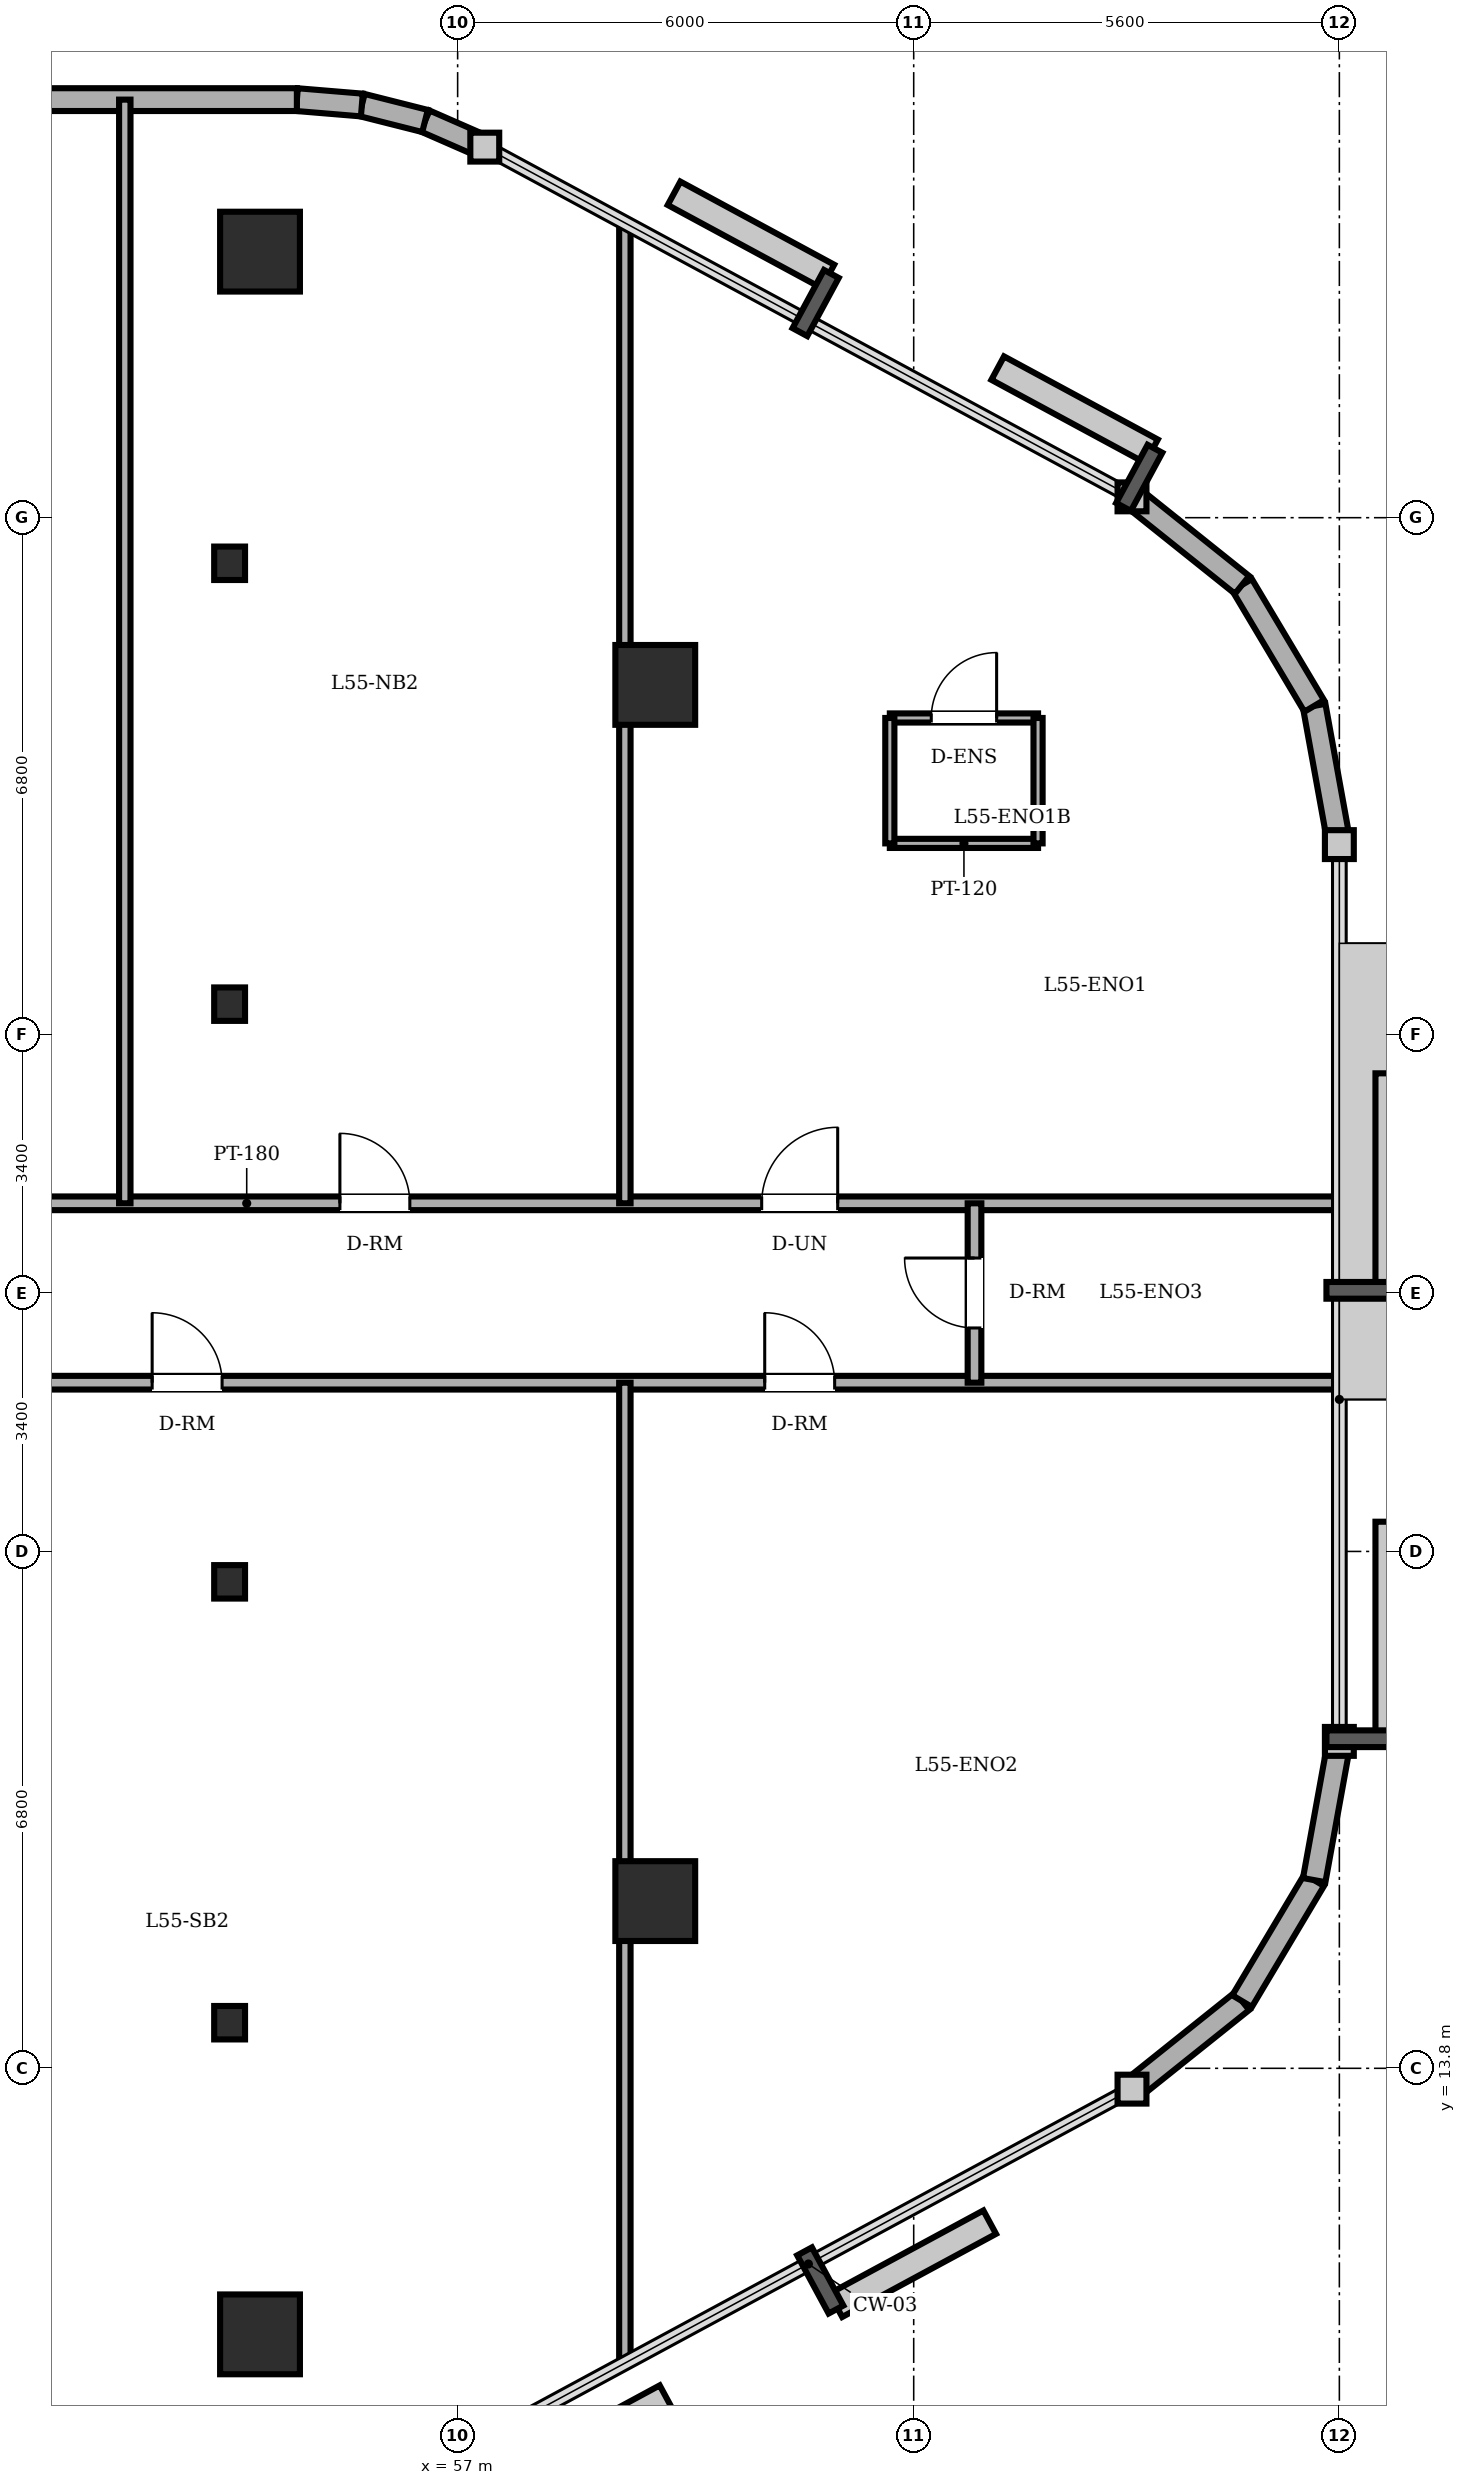
"""IFC4 building model, lengths in metres.
Left out: names, types, materials, properties, quantities, classifications, styles, units other than length and angle.
Written with IfcOpenShell. Run it as: python <this file> out.ifc"""

import sys

from ifc_helpers import new_model, si_unit, direction, frame, frame_2d, origin, origin_2d, place, context, subcontext, project, spatial, rectangle, circle, i_section, extrude, element, fill, save


model = new_model("IFC4")
c1 = context("Model", 3, precision=1e-05, world=origin(), true_north=direction((0.0, 1.0)))
c2 = subcontext(c1, "Body", "Model", "MODEL_VIEW")
j1 = project(units=[si_unit("LENGTHUNIT", "METRE"), si_unit("PLANEANGLEUNIT", "RADIAN")], contexts=[c1])
p1 = place(None, origin())
s1 = spatial("IfcSite", under=j1, at=p1, CompositionType="ELEMENT")
p2 = place(p1, origin())
s2 = spatial("IfcBuilding", under=s1, at=p2, CompositionType="ELEMENT")
p3 = place(p2, frame((0.0, 0.0, 212.1)))
s3 = spatial("IfcBuildingStorey", under=s2, at=p3, CompositionType="ELEMENT", Elevation=212.1)
for number, where, z_axis, x_axis in (
    (1, (54.4, 10.3, 0.0), (0.0, 0.0, 1.0), (1.0, 0.0, 0.0)),
    (2, (59.6, 16.0, 0.0), (0.0, 0.0, 1.0), (1.0, 0.0, 0.0)),
    (3, (59.6, 32.0, 0.0), (0.0, 0.0, 1.0), (1.0, 0.0, 0.0)),
    (4, (54.4, 37.7, 0.0), (0.0, 0.0, 1.0), (1.0, 0.0, 0.0)),
):
    element("IfcColumn", number, at=place(p3, frame(where, z_axis=z_axis, x_axis=x_axis)), inside=s3, PredefinedType="COLUMN", context=c2, shape_type="SweptSolid", body=[
        extrude(circle(Radius=0.525, at=origin_2d()), origin(), (0.0, 0.0, 1.0), 3.6),
    ])
for number, where, z_axis, x_axis in (
    (5, (54.0, 14.4, 0.0), (0.0, 0.0, 1.0), (1.0, 0.0, 0.0)),
    (6, (54.0, 20.2, 0.0), (0.0, 0.0, 1.0), (1.0, 0.0, 0.0)),
    (7, (54.0, 27.8, 0.0), (0.0, 0.0, 1.0), (1.0, 0.0, 0.0)),
    (8, (54.0, 33.6, 0.0), (0.0, 0.0, 1.0), (1.0, 0.0, 0.0)),
):
    element("IfcColumn", number, at=place(p3, frame(where, z_axis=z_axis, x_axis=x_axis)), inside=s3, PredefinedType="COLUMN", context=c2, shape_type="SweptSolid", body=[
        extrude(i_section(OverallWidth=0.406, OverallDepth=0.44, WebThickness=0.024, FlangeThickness=0.039, FilletRadius=0.015, at=origin_2d()), origin(), (0.0, 0.0, 1.0), 3.6),
    ])
p4 = place(p3, frame((65.872, 13.526, 0.0), z_axis=(0.0, 0.0, 1.0), x_axis=(0.780920189257, 0.624630817372, 0.0)))
e9 = element("IfcWall", 9, at=p4, inside=s3, PredefinedType="SOLIDWALL", context=c2, shape_type="SweptSolid", body=[
    extrude(rectangle(XDim=1.854, YDim=0.3, at=frame_2d((0.927, 0.0))), origin(), (0.0, 0.0, 1.0), 3.4),
])
p5 = place(p3, frame((67.32, 14.684, 0.0), z_axis=(0.0, 0.0, 1.0), x_axis=(0.512072018927, 0.858942516955, 0.0)))
e10 = element("IfcWall", 10, at=p5, inside=s3, PredefinedType="SOLIDWALL", context=c2, shape_type="SweptSolid", body=[
    extrude(rectangle(XDim=1.853, YDim=0.3, at=frame_2d((0.927, 0.0))), origin(), (0.0, 0.0, 1.0), 3.4),
])
for number, where, z_axis, x_axis in (
    (11, (68.269, 16.276, 0.0), (0.0, 0.0, 1.0), (0.178, 0.984, 0.0)),
    (12, (68.6, 29.899, 0.0), (0.0, 0.0, 1.0), (-0.178, 0.984, 0.0)),
):
    element("IfcWall", number, at=place(p3, frame(where, z_axis=z_axis, x_axis=x_axis)), inside=s3, PredefinedType="SOLIDWALL", context=c2, shape_type="SweptSolid", body=[
        extrude(rectangle(XDim=1.855, YDim=0.3, at=frame_2d((0.927, 0.0))), origin(), (0.0, 0.0, 1.0), 3.4),
    ])
p6 = place(p3, frame((68.269, 31.724, 0.0), z_axis=(0.0, 0.0, 1.0), x_axis=(-0.512072018927, 0.858942516955, 0.0)))
e13 = element("IfcWall", 13, at=p6, inside=s3, PredefinedType="SOLIDWALL", context=c2, shape_type="SweptSolid", body=[
    extrude(rectangle(XDim=1.853, YDim=0.3, at=frame_2d((0.927, 0.0))), origin(), (0.0, 0.0, 1.0), 3.4),
])
p7 = place(p3, frame((67.32, 33.316, 0.0), z_axis=(0.0, 0.0, 1.0), x_axis=(-0.780920189257, 0.624630817372, 0.0)))
e14 = element("IfcWall", 14, at=p7, inside=s3, PredefinedType="SOLIDWALL", context=c2, shape_type="SweptSolid", body=[
    extrude(rectangle(XDim=1.854, YDim=0.3, at=frame_2d((0.927, 0.0))), origin(), (0.0, 0.0, 1.0), 3.4),
])
p8 = place(p3, frame((57.357, 39.075, 0.0), z_axis=(0.0, 0.0, 1.0), x_axis=(-0.916085473636, 0.400983048261, 0.0)))
e15 = element("IfcWall", 15, at=p8, inside=s3, PredefinedType="SOLIDWALL", context=c2, shape_type="SweptSolid", body=[
    extrude(rectangle(XDim=0.858, YDim=0.3, at=frame_2d((0.429, 0.0))), origin(), (0.0, 0.0, 1.0), 3.4),
])
p9 = place(p3, frame((56.571, 39.419, 0.0), z_axis=(0.0, 0.0, 1.0), x_axis=(-0.969536346338, 0.244947490555, 0.0)))
e16 = element("IfcWall", 16, at=p9, inside=s3, PredefinedType="SOLIDWALL", context=c2, shape_type="SweptSolid", body=[
    extrude(rectangle(XDim=0.857, YDim=0.3, at=frame_2d((0.429, 0.0))), origin(), (0.0, 0.0, 1.0), 3.4),
])
p10 = place(p3, frame((55.74, 39.629, 0.0), z_axis=(0.0, 0.0, 1.0), x_axis=(-0.996565355958, 0.082809971041, 0.0)))
e17 = element("IfcWall", 17, at=p10, inside=s3, PredefinedType="SOLIDWALL", context=c2, shape_type="SweptSolid", body=[
    extrude(rectangle(XDim=0.858, YDim=0.3, at=frame_2d((0.429, 0.0))), origin(), (0.0, 0.0, 1.0), 3.4),
])
p11 = place(p3, frame((54.885, 39.7, 0.0), z_axis=(0.0, 0.0, 1.0), x_axis=(-1.0, 0.0, 0.0)))
e18 = element("IfcWall", 18, at=p11, inside=s3, PredefinedType="SOLIDWALL", context=c2, shape_type="SweptSolid", body=[
    extrude(rectangle(XDim=32.485, YDim=0.3, at=frame_2d((16.243, 0.0))), origin(), (0.0, 0.0, 1.0), 3.4),
])
p12 = place(p11, frame((19.21, 0.0, 0.0)))
e19 = element("IfcOpeningElement", 19, at=p12, cuts=e18, PredefinedType="OPENING", context=c2, shape_type="SweptSolid", body=[
    extrude(rectangle(XDim=0.95, YDim=2.2, at=frame_2d((0.475, 1.1))), frame((0.0, 0.16, 0.0), z_axis=(0.0, -1.0, 0.0), x_axis=(1.0, 0.0, 0.0)), (0.0, 0.0, 1.0), 0.32),
])
p13 = place(p11, frame((5.846, 0.0, 0.85)))
e20 = element("IfcOpeningElement", 20, at=p13, cuts=e18, PredefinedType="OPENING", context=c2, shape_type="SweptSolid", body=[
    extrude(rectangle(XDim=1.35, YDim=1.55, at=frame_2d((0.675, 0.775))), frame((0.0, 0.16, 0.0), z_axis=(0.0, -1.0, 0.0), x_axis=(1.0, 0.0, 0.0)), (0.0, 0.0, 1.0), 0.32),
])
p14 = place(p11, frame((10.103, 0.0, 0.85)))
e21 = element("IfcOpeningElement", 21, at=p14, cuts=e18, PredefinedType="OPENING", context=c2, shape_type="SweptSolid", body=[
    extrude(rectangle(XDim=1.35, YDim=1.55, at=frame_2d((0.675, 0.775))), frame((0.0, 0.16, 0.0), z_axis=(0.0, -1.0, 0.0), x_axis=(1.0, 0.0, 0.0)), (0.0, 0.0, 1.0), 0.32),
])
p15 = place(p11, frame((16.577, 0.0, 0.85)))
e22 = element("IfcOpeningElement", 22, at=p15, cuts=e18, PredefinedType="OPENING", context=c2, shape_type="SweptSolid", body=[
    extrude(rectangle(XDim=1.35, YDim=1.55, at=frame_2d((0.675, 0.775))), frame((0.0, 0.16, 0.0), z_axis=(0.0, -1.0, 0.0), x_axis=(1.0, 0.0, 0.0)), (0.0, 0.0, 1.0), 0.32),
])
p16 = place(p11, frame((22.91, 0.0, 0.85)))
e23 = element("IfcOpeningElement", 23, at=p16, cuts=e18, PredefinedType="OPENING", context=c2, shape_type="SweptSolid", body=[
    extrude(rectangle(XDim=1.35, YDim=1.55, at=frame_2d((0.675, 0.775))), frame((0.0, 0.16, 0.0), z_axis=(0.0, -1.0, 0.0), x_axis=(1.0, 0.0, 0.0)), (0.0, 0.0, 1.0), 0.32),
])
p17 = place(p11, frame((26.51, 0.0, 0.85)))
e24 = element("IfcOpeningElement", 24, at=p17, cuts=e18, PredefinedType="OPENING", context=c2, shape_type="SweptSolid", body=[
    extrude(rectangle(XDim=1.35, YDim=1.55, at=frame_2d((0.675, 0.775))), frame((0.0, 0.16, 0.0), z_axis=(0.0, -1.0, 0.0), x_axis=(1.0, 0.0, 0.0)), (0.0, 0.0, 1.0), 0.32),
])
p18 = place(p11, frame((29.835, 0.0, 0.85)))
e25 = element("IfcOpeningElement", 25, at=p18, cuts=e18, PredefinedType="OPENING", context=c2, shape_type="SweptSolid", body=[
    extrude(rectangle(XDim=1.35, YDim=1.55, at=frame_2d((0.675, 0.775))), frame((0.0, 0.16, 0.0), z_axis=(0.0, -1.0, 0.0), x_axis=(1.0, 0.0, 0.0)), (0.0, 0.0, 1.0), 0.32),
])
p19 = place(p3, frame((62.686, 31.565, 0.0), z_axis=(0.0, 0.0, 1.0), x_axis=(1.0, 0.0, 0.0)))
e26 = element("IfcWall", 26, at=p19, inside=s3, PredefinedType="PARTITIONING", context=c2, shape_type="SweptSolid", body=[
    extrude(rectangle(XDim=1.95, YDim=0.12, at=frame_2d((0.975, 0.0))), origin(), (0.0, 0.0, 1.0), 3.4),
])
p20 = place(p19, frame((0.545, 0.0, 0.0)))
e27 = element("IfcOpeningElement", 27, at=p20, cuts=e26, PredefinedType="OPENING", context=c2, shape_type="SweptSolid", body=[
    extrude(rectangle(XDim=0.86, YDim=2.1, at=frame_2d((0.43, 1.05))), frame((0.0, 0.07, 0.0), z_axis=(0.0, -1.0, 0.0), x_axis=(1.0, 0.0, 0.0)), (0.0, 0.0, 1.0), 0.14),
])
p21 = place(p3, frame((64.636, 29.915, 0.0), z_axis=(0.0, 0.0, 1.0), x_axis=(-1.0, 0.0, 0.0)))
e28 = element("IfcWall", 28, at=p21, inside=s3, PredefinedType="PARTITIONING", context=c2, shape_type="SweptSolid", body=[
    extrude(rectangle(XDim=1.95, YDim=0.12, at=frame_2d((0.975, 0.0))), origin(), (0.0, 0.0, 1.0), 3.4),
])
for number, where, z_axis, x_axis in (
    (29, (62.686, 31.565, 0.0), (0.0, 0.0, 1.0), (0.0, -1.0, 0.0)),
    (30, (64.636, 29.915, 0.0), (0.0, 0.0, 1.0), (0.0, 1.0, 0.0)),
):
    element("IfcWall", number, at=place(p3, frame(where, z_axis=z_axis, x_axis=x_axis)), inside=s3, PredefinedType="PARTITIONING", context=c2, shape_type="SweptSolid", body=[
        extrude(rectangle(XDim=1.65, YDim=0.12, at=frame_2d((0.825, 0.0))), origin(), (0.0, 0.0, 1.0), 3.4),
    ])
p22 = place(p3, frame((39.85, 22.82, 0.0), z_axis=(0.0, 0.0, 1.0), x_axis=(1.0, 0.0, 0.0)))
e31 = element("IfcWall", 31, at=p22, inside=s3, PredefinedType="PARTITIONING", context=c2, shape_type="SweptSolid", body=[
    extrude(rectangle(XDim=28.75, YDim=0.18, at=frame_2d((14.375, 0.0))), origin(), (0.0, 0.0, 1.0), 3.4),
])
p23 = place(p22, frame((13.131, 0.0, 0.0)))
e32 = element("IfcOpeningElement", 32, at=p23, cuts=e31, PredefinedType="OPENING", context=c2, shape_type="SweptSolid", body=[
    extrude(rectangle(XDim=0.92, YDim=2.1, at=frame_2d((0.46, 1.05))), frame((0.0, 0.1, 0.0), z_axis=(0.0, -1.0, 0.0), x_axis=(1.0, 0.0, 0.0)), (0.0, 0.0, 1.0), 0.2),
])
p24 = place(p22, frame((21.19, 0.0, 0.0)))
e33 = element("IfcOpeningElement", 33, at=p24, cuts=e31, PredefinedType="OPENING", context=c2, shape_type="SweptSolid", body=[
    extrude(rectangle(XDim=0.92, YDim=2.1, at=frame_2d((0.46, 1.05))), frame((0.0, 0.1, 0.0), z_axis=(0.0, -1.0, 0.0), x_axis=(1.0, 0.0, 0.0)), (0.0, 0.0, 1.0), 0.2),
])
p25 = place(p3, frame((39.85, 25.18, 0.0), z_axis=(0.0, 0.0, 1.0), x_axis=(1.0, 0.0, 0.0)))
e34 = element("IfcWall", 34, at=p25, inside=s3, PredefinedType="PARTITIONING", context=c2, shape_type="SweptSolid", body=[
    extrude(rectangle(XDim=28.75, YDim=0.18, at=frame_2d((14.375, 0.0))), origin(), (0.0, 0.0, 1.0), 3.4),
])
p26 = place(p25, frame((6.185, 0.0, 0.0)))
e35 = element("IfcOpeningElement", 35, at=p26, cuts=e34, PredefinedType="OPENING", context=c2, shape_type="SweptSolid", body=[
    extrude(rectangle(XDim=0.92, YDim=2.1, at=frame_2d((0.46, 1.05))), frame((0.0, 0.1, 0.0), z_axis=(0.0, -1.0, 0.0), x_axis=(1.0, 0.0, 0.0)), (0.0, 0.0, 1.0), 0.2),
])
p27 = place(p25, frame((15.601, 0.0, 0.0)))
e36 = element("IfcOpeningElement", 36, at=p27, cuts=e34, PredefinedType="OPENING", context=c2, shape_type="SweptSolid", body=[
    extrude(rectangle(XDim=0.92, YDim=2.1, at=frame_2d((0.46, 1.05))), frame((0.0, 0.1, 0.0), z_axis=(0.0, -1.0, 0.0), x_axis=(1.0, 0.0, 0.0)), (0.0, 0.0, 1.0), 0.2),
])
p28 = place(p25, frame((21.15, 0.0, 0.0)))
e37 = element("IfcOpeningElement", 37, at=p28, cuts=e34, PredefinedType="OPENING", context=c2, shape_type="SweptSolid", body=[
    extrude(rectangle(XDim=1.0, YDim=2.15, at=frame_2d((0.5, 1.075))), frame((0.0, 0.1, 0.0), z_axis=(0.0, -1.0, 0.0), x_axis=(1.0, 0.0, 0.0)), (0.0, 0.0, 1.0), 0.2),
])
p29 = place(p3, frame((52.621, 25.18, 0.0), z_axis=(0.0, 0.0, 1.0), x_axis=(0.0, 1.0, 0.0)))
e38 = element("IfcWall", 38, at=p29, inside=s3, PredefinedType="PARTITIONING", context=c2, shape_type="SweptSolid", body=[
    extrude(rectangle(XDim=14.52, YDim=0.15, at=frame_2d((7.26, 0.0))), origin(), (0.0, 0.0, 1.0), 3.4),
])
for number, where, z_axis, x_axis in (
    (39, (59.2, 9.921, 0.0), (0.0, 0.0, 1.0), (0.0, 1.0, 0.0)),
    (40, (59.2, 25.18, 0.0), (0.0, 0.0, 1.0), (0.0, 1.0, 0.0)),
):
    element("IfcWall", number, at=place(p3, frame(where, z_axis=z_axis, x_axis=x_axis)), inside=s3, PredefinedType="PARTITIONING", context=c2, shape_type="SweptSolid", body=[
        extrude(rectangle(XDim=12.899, YDim=0.15, at=frame_2d((6.45, 0.0))), origin(), (0.0, 0.0, 1.0), 3.4),
    ])
p30 = place(p3, frame((63.8, 22.82, 0.0), z_axis=(0.0, 0.0, 1.0), x_axis=(0.0, 1.0, 0.0)))
e41 = element("IfcWall", 41, at=p30, inside=s3, PredefinedType="PARTITIONING", context=c2, shape_type="SweptSolid", body=[
    extrude(rectangle(XDim=2.36, YDim=0.18, at=frame_2d((1.18, 0.0))), origin(), (0.0, 0.0, 1.0), 3.4),
])
p31 = place(p30, frame((0.72, 0.0, 0.0)))
e42 = element("IfcOpeningElement", 42, at=p31, cuts=e41, PredefinedType="OPENING", context=c2, shape_type="SweptSolid", body=[
    extrude(rectangle(XDim=0.92, YDim=2.1, at=frame_2d((0.46, 1.05))), frame((0.0, 0.1, 0.0), z_axis=(0.0, -1.0, 0.0), x_axis=(1.0, 0.0, 0.0)), (0.0, 0.0, 1.0), 0.2),
])
p32 = place(p20, origin())
e43 = element("IfcDoor", 43, at=p32, inside=s3, OperationType="SINGLE_SWING_RIGHT", PredefinedType="DOOR", context=c2, shape_type="SweptSolid", body=[
    extrude(rectangle(XDim=0.86, YDim=2.1, at=frame_2d((0.43, 1.05))), frame((0.0, 0.025, 0.0), z_axis=(0.0, -1.0, 0.0), x_axis=(1.0, 0.0, 0.0)), (0.0, 0.0, 1.0), 0.05),
])
fill(e27, e43)
p33 = place(p27, origin())
e44 = element("IfcDoor", 44, at=p33, inside=s3, OperationType="SINGLE_SWING_LEFT", PredefinedType="DOOR", context=c2, shape_type="SweptSolid", body=[
    extrude(rectangle(XDim=0.92, YDim=2.1, at=frame_2d((0.46, 1.05))), frame((0.0, 0.025, 0.0), z_axis=(0.0, -1.0, 0.0), x_axis=(1.0, 0.0, 0.0)), (0.0, 0.0, 1.0), 0.05),
])
fill(e36, e44)
p34 = place(p23, origin())
e45 = element("IfcDoor", 45, at=p34, inside=s3, OperationType="SINGLE_SWING_LEFT", PredefinedType="DOOR", context=c2, shape_type="SweptSolid", body=[
    extrude(rectangle(XDim=0.92, YDim=2.1, at=frame_2d((0.46, 1.05))), frame((0.0, 0.025, 0.0), z_axis=(0.0, -1.0, 0.0), x_axis=(1.0, 0.0, 0.0)), (0.0, 0.0, 1.0), 0.05),
])
fill(e32, e45)
p35 = place(p28, origin())
e46 = element("IfcDoor", 46, at=p35, inside=s3, OperationType="SINGLE_SWING_RIGHT", PredefinedType="DOOR", context=c2, shape_type="SweptSolid", body=[
    extrude(rectangle(XDim=1.0, YDim=2.15, at=frame_2d((0.5, 1.075))), frame((0.0, 0.025, 0.0), z_axis=(0.0, -1.0, 0.0), x_axis=(1.0, 0.0, 0.0)), (0.0, 0.0, 1.0), 0.05),
])
fill(e37, e46)
p36 = place(p24, origin())
e47 = element("IfcDoor", 47, at=p36, inside=s3, OperationType="SINGLE_SWING_LEFT", PredefinedType="DOOR", context=c2, shape_type="SweptSolid", body=[
    extrude(rectangle(XDim=0.92, YDim=2.1, at=frame_2d((0.46, 1.05))), frame((0.0, 0.025, 0.0), z_axis=(0.0, -1.0, 0.0), x_axis=(1.0, 0.0, 0.0)), (0.0, 0.0, 1.0), 0.05),
])
fill(e33, e47)
p37 = place(p31, origin())
e48 = element("IfcDoor", 48, at=p37, inside=s3, OperationType="SINGLE_SWING_RIGHT", PredefinedType="DOOR", context=c2, shape_type="SweptSolid", body=[
    extrude(rectangle(XDim=0.92, YDim=2.1, at=frame_2d((0.46, 1.05))), frame((0.0, 0.025, 0.0), z_axis=(0.0, -1.0, 0.0), x_axis=(1.0, 0.0, 0.0)), (0.0, 0.0, 1.0), 0.05),
])
fill(e42, e48)
save(model, sys.argv[1])
